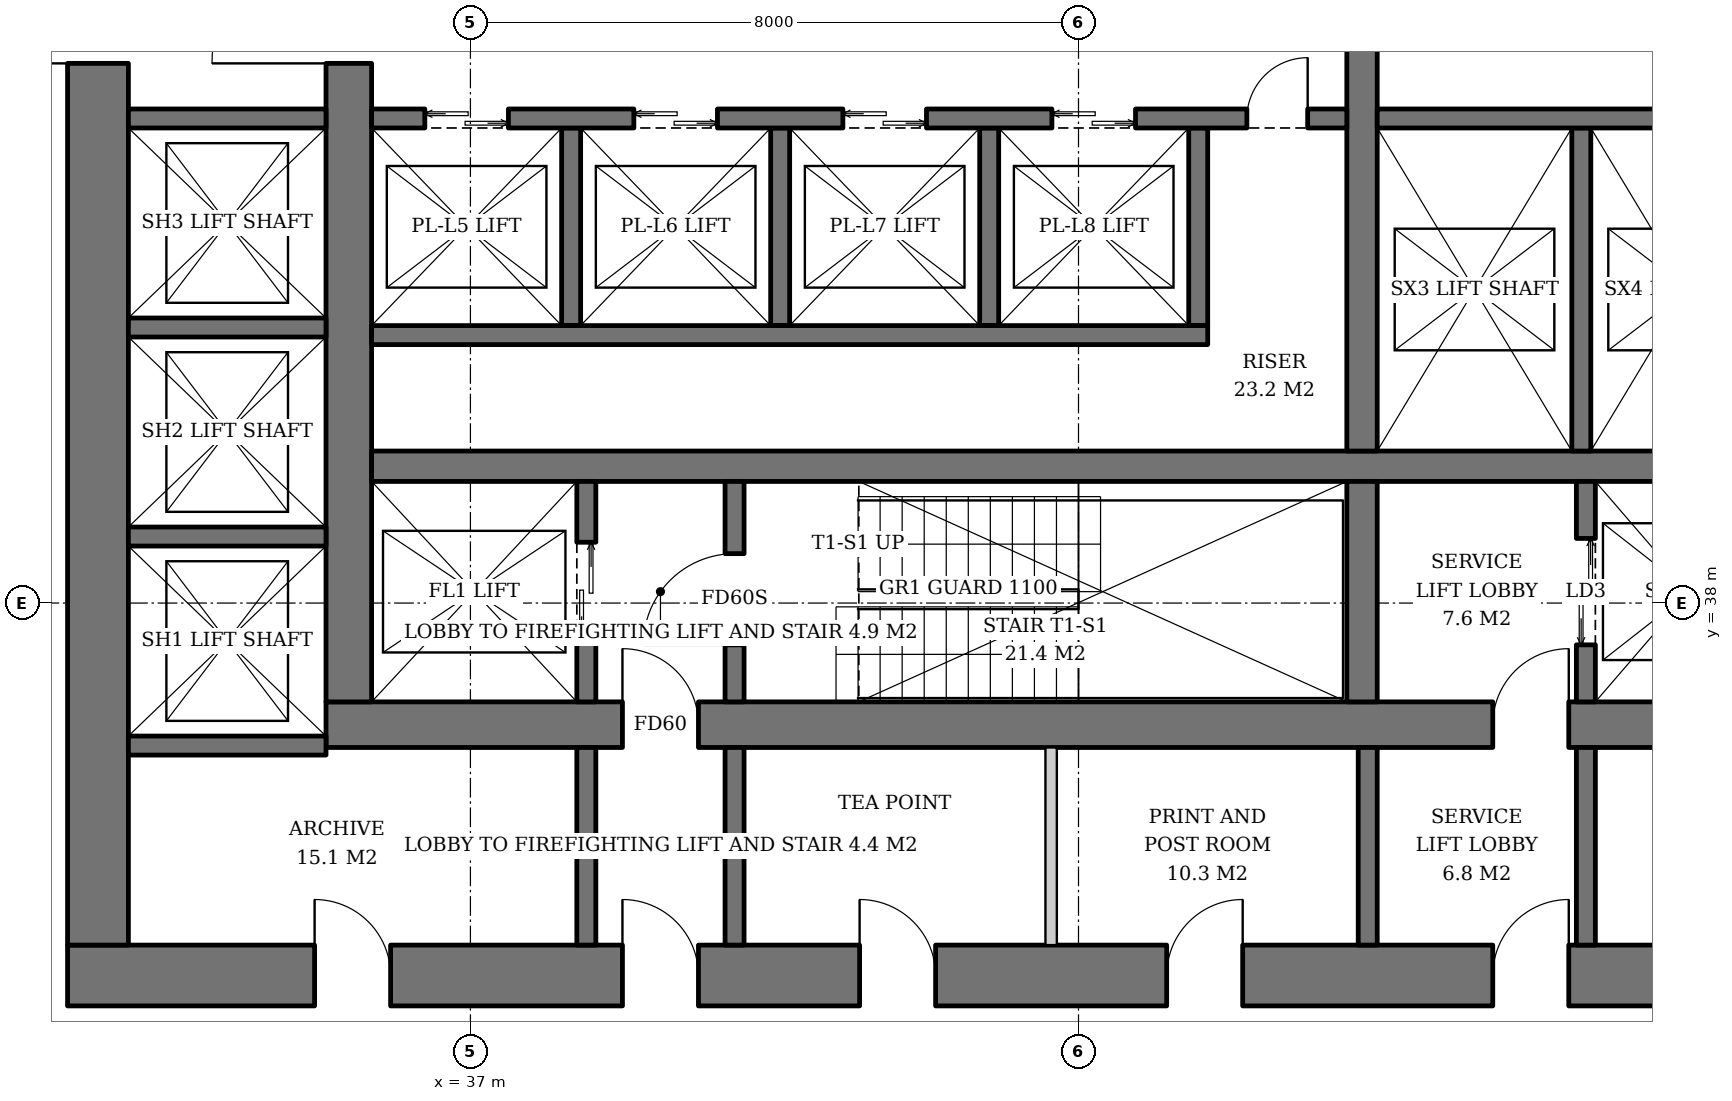
"""IFC4 building model, lengths in metres.
Left out: names, types, materials, properties, quantities, classifications, styles, units other than length and angle.
Written with IfcOpenShell. Run it as: python <this file> out.ifc"""

import sys

from ifc_helpers import new_model, si_unit, direction, frame, frame_2d, origin, place, context, subcontext, project, spatial, rectangle, extrude, element, fill, save


model = new_model("IFC4")
c1 = context("Model", 3, precision=1e-05, world=origin(), true_north=direction((0.0, 1.0)))
c2 = subcontext(c1, "Body", "Model", "MODEL_VIEW")
j1 = project(units=[si_unit("LENGTHUNIT", "METRE"), si_unit("PLANEANGLEUNIT", "RADIAN")], contexts=[c1])
p1 = place(None, origin())
s1 = spatial("IfcSite", under=j1, at=p1, CompositionType="ELEMENT")
p2 = place(p1, origin())
s2 = spatial("IfcBuilding", under=s1, at=p2, CompositionType="ELEMENT")
p3 = place(p2, frame((0.0, 0.0, 51.4)))
s3 = spatial("IfcBuildingStorey", under=s2, at=p3, CompositionType="ELEMENT", Elevation=51.4)
p4 = place(p3, frame((35.1, 36.4, 0.0), z_axis=(0.0, 0.0, 1.0), x_axis=(1.0, 0.0, 0.0)))
e1 = element("IfcWall", 1, at=p4, inside=s3, PredefinedType="SHEAR", context=c2, shape_type="SweptSolid", body=[
    extrude(rectangle(XDim=19.8, YDim=0.6, at=frame_2d((9.9, 0.0))), origin(), (0.0, 0.0, 1.0), 3.8),
])
p5 = place(p4, frame((3.9, 0.0, 0.0)))
e2 = element("IfcOpeningElement", 2, at=p5, cuts=e1, PredefinedType="OPENING", context=c2, shape_type="SweptSolid", body=[
    extrude(rectangle(XDim=1.0, YDim=2.1, at=frame_2d((0.5, 1.05))), frame((0.0, 0.31, 0.0), z_axis=(0.0, -1.0, 0.0), x_axis=(1.0, 0.0, 0.0)), (0.0, 0.0, 1.0), 0.62),
])
p6 = place(p4, frame((15.35, 0.0, 0.0)))
e3 = element("IfcOpeningElement", 3, at=p6, cuts=e1, PredefinedType="OPENING", context=c2, shape_type="SweptSolid", body=[
    extrude(rectangle(XDim=1.0, YDim=2.1, at=frame_2d((0.5, 1.05))), frame((0.0, 0.31, 0.0), z_axis=(0.0, -1.0, 0.0), x_axis=(1.0, 0.0, 0.0)), (0.0, 0.0, 1.0), 0.62),
])
p7 = place(p3, frame((35.4, 36.7, 0.0), z_axis=(0.0, 0.0, 1.0), x_axis=(0.0, 1.0, 0.0)))
e4 = element("IfcWall", 4, at=p7, inside=s3, PredefinedType="SHEAR", context=c2, shape_type="SweptSolid", body=[
    extrude(rectangle(XDim=18.6, YDim=0.6, at=frame_2d((9.3, 0.0))), origin(), (0.0, 0.0, 1.0), 3.8),
])
p8 = place(p7, frame((8.4, 0.0, 0.0)))
e5 = element("IfcOpeningElement", 5, at=p8, cuts=e4, PredefinedType="OPENING", context=c2, shape_type="SweptSolid", body=[
    extrude(rectangle(XDim=1.8, YDim=2.4, at=frame_2d((0.9, 1.2))), frame((0.0, 0.31, 0.0), z_axis=(0.0, -1.0, 0.0), x_axis=(1.0, 0.0, 0.0)), (0.0, 0.0, 1.0), 0.62),
])
p9 = place(p3, frame((31.7, 33.1, 0.0), z_axis=(0.0, 0.0, 1.0), x_axis=(1.0, 0.0, 0.0)))
e6 = element("IfcWall", 6, at=p9, inside=s3, PredefinedType="SHEAR", context=c2, shape_type="SweptSolid", body=[
    extrude(rectangle(XDim=26.6, YDim=0.8, at=frame_2d((13.3, 0.0))), origin(), (0.0, 0.0, 1.0), 3.8),
])
p10 = place(p9, frame((7.3, 0.0, 0.0)))
e7 = element("IfcOpeningElement", 7, at=p10, cuts=e6, PredefinedType="OPENING", context=c2, shape_type="SweptSolid", body=[
    extrude(rectangle(XDim=1.0, YDim=2.1, at=frame_2d((0.5, 1.05))), frame((0.0, 0.41, 0.0), z_axis=(0.0, -1.0, 0.0), x_axis=(1.0, 0.0, 0.0)), (0.0, 0.0, 1.0), 0.82),
])
p11 = place(p9, frame((18.75, 0.0, 0.0)))
e8 = element("IfcOpeningElement", 8, at=p11, cuts=e6, PredefinedType="OPENING", context=c2, shape_type="SweptSolid", body=[
    extrude(rectangle(XDim=1.0, YDim=2.1, at=frame_2d((0.5, 1.05))), frame((0.0, 0.41, 0.0), z_axis=(0.0, -1.0, 0.0), x_axis=(1.0, 0.0, 0.0)), (0.0, 0.0, 1.0), 0.82),
])
p12 = place(p9, frame((3.25, 0.0, 0.0)))
e9 = element("IfcOpeningElement", 9, at=p12, cuts=e6, PredefinedType="OPENING", context=c2, shape_type="SweptSolid", body=[
    extrude(rectangle(XDim=1.0, YDim=2.1, at=frame_2d((0.5, 1.05))), frame((0.0, 0.41, 0.0), z_axis=(0.0, -1.0, 0.0), x_axis=(1.0, 0.0, 0.0)), (0.0, 0.0, 1.0), 0.82),
])
p13 = place(p9, frame((10.42, 0.0, 0.0)))
e10 = element("IfcOpeningElement", 10, at=p13, cuts=e6, PredefinedType="OPENING", context=c2, shape_type="SweptSolid", body=[
    extrude(rectangle(XDim=1.0, YDim=2.1, at=frame_2d((0.5, 1.05))), frame((0.0, 0.41, 0.0), z_axis=(0.0, -1.0, 0.0), x_axis=(1.0, 0.0, 0.0)), (0.0, 0.0, 1.0), 0.82),
])
p14 = place(p9, frame((14.46, 0.0, 0.0)))
e11 = element("IfcOpeningElement", 11, at=p14, cuts=e6, PredefinedType="OPENING", context=c2, shape_type="SweptSolid", body=[
    extrude(rectangle(XDim=1.0, YDim=2.1, at=frame_2d((0.5, 1.05))), frame((0.0, 0.41, 0.0), z_axis=(0.0, -1.0, 0.0), x_axis=(1.0, 0.0, 0.0)), (0.0, 0.0, 1.0), 0.82),
])
p15 = place(p9, frame((22.45, 0.0, 0.0)))
e12 = element("IfcOpeningElement", 12, at=p15, cuts=e6, PredefinedType="OPENING", context=c2, shape_type="SweptSolid", body=[
    extrude(rectangle(XDim=1.0, YDim=2.1, at=frame_2d((0.5, 1.05))), frame((0.0, 0.41, 0.0), z_axis=(0.0, -1.0, 0.0), x_axis=(1.0, 0.0, 0.0)), (0.0, 0.0, 1.0), 0.82),
])
p16 = place(p3, frame((32.1, 33.5, 0.0), z_axis=(0.0, 0.0, 1.0), x_axis=(0.0, 1.0, 0.0)))
e13 = element("IfcWall", 13, at=p16, inside=s3, PredefinedType="SHEAR", context=c2, shape_type="SweptSolid", body=[
    extrude(rectangle(XDim=25.0, YDim=0.8, at=frame_2d((12.5, 0.0))), origin(), (0.0, 0.0, 1.0), 3.8),
])
p17 = place(p16, frame((11.6, 0.0, 0.0)))
e14 = element("IfcOpeningElement", 14, at=p17, cuts=e13, PredefinedType="OPENING", context=c2, shape_type="SweptSolid", body=[
    extrude(rectangle(XDim=1.8, YDim=2.4, at=frame_2d((0.9, 1.2))), frame((0.0, 0.41, 0.0), z_axis=(0.0, -1.0, 0.0), x_axis=(1.0, 0.0, 0.0)), (0.0, 0.0, 1.0), 0.82),
])
p18 = place(p3, frame((35.7, 39.8, 0.0), z_axis=(0.0, 0.0, 1.0), x_axis=(1.0, 0.0, 0.0)))
e15 = element("IfcWall", 15, at=p18, inside=s3, PredefinedType="SHEAR", context=c2, shape_type="SweptSolid", body=[
    extrude(rectangle(XDim=18.6, YDim=0.4, at=frame_2d((9.3, 0.0))), origin(), (0.0, 0.0, 1.0), 3.8),
])
p19 = place(p3, frame((48.73, 36.7, 0.0), z_axis=(0.0, 0.0, 1.0), x_axis=(0.0, 1.0, 0.0)))
e16 = element("IfcWall", 16, at=p19, inside=s3, PredefinedType="SHEAR", context=c2, shape_type="SweptSolid", body=[
    extrude(rectangle(XDim=2.9, YDim=0.4, at=frame_2d((1.45, 0.0))), origin(), (0.0, 0.0, 1.0), 3.8),
])
p20 = place(p3, frame((48.73, 40.0, 0.0), z_axis=(0.0, 0.0, 1.0), x_axis=(0.0, 1.0, 0.0)))
e17 = element("IfcWall", 17, at=p20, inside=s3, PredefinedType="SHEAR", context=c2, shape_type="SweptSolid", body=[
    extrude(rectangle(XDim=12.0, YDim=0.4, at=frame_2d((6.0, 0.0))), origin(), (0.0, 0.0, 1.0), 3.8),
])
p21 = place(p3, frame((38.525, 36.7, 0.0), z_axis=(0.0, 0.0, 1.0), x_axis=(0.0, 1.0, 0.0)))
e18 = element("IfcWall", 18, at=p21, inside=s3, PredefinedType="SHEAR", context=c2, shape_type="SweptSolid", body=[
    extrude(rectangle(XDim=2.9, YDim=0.25, at=frame_2d((1.45, 0.0))), origin(), (0.0, 0.0, 1.0), 3.8),
])
p22 = place(p21, frame((0.8, 0.0, 0.0)))
e19 = element("IfcOpeningElement", 19, at=p22, cuts=e18, PredefinedType="OPENING", context=c2, shape_type="SweptSolid", body=[
    extrude(rectangle(XDim=1.3, YDim=2.2, at=frame_2d((0.65, 1.1))), frame((0.0, 0.135, 0.0), z_axis=(0.0, -1.0, 0.0), x_axis=(1.0, 0.0, 0.0)), (0.0, 0.0, 1.0), 0.27),
])
p23 = place(p3, frame((40.475, 36.7, 0.0), z_axis=(0.0, 0.0, 1.0), x_axis=(0.0, 1.0, 0.0)))
e20 = element("IfcWall", 20, at=p23, inside=s3, PredefinedType="SHEAR", context=c2, shape_type="SweptSolid", body=[
    extrude(rectangle(XDim=2.9, YDim=0.25, at=frame_2d((1.45, 0.0))), origin(), (0.0, 0.0, 1.0), 3.8),
])
p24 = place(p23, frame((0.75, 0.0, 0.0)))
e21 = element("IfcOpeningElement", 21, at=p24, cuts=e20, PredefinedType="OPENING", context=c2, shape_type="SweptSolid", body=[
    extrude(rectangle(XDim=1.2, YDim=2.1, at=frame_2d((0.6, 1.05))), frame((0.0, 0.135, 0.0), z_axis=(0.0, -1.0, 0.0), x_axis=(1.0, 0.0, 0.0)), (0.0, 0.0, 1.0), 0.27),
])
p25 = place(p3, frame((51.675, 36.7, 0.0), z_axis=(0.0, 0.0, 1.0), x_axis=(0.0, 1.0, 0.0)))
e22 = element("IfcWall", 22, at=p25, inside=s3, PredefinedType="SHEAR", context=c2, shape_type="SweptSolid", body=[
    extrude(rectangle(XDim=2.9, YDim=0.25, at=frame_2d((1.45, 0.0))), origin(), (0.0, 0.0, 1.0), 3.8),
])
p26 = place(p25, frame((0.75, 0.0, 0.0)))
e23 = element("IfcOpeningElement", 23, at=p26, cuts=e22, PredefinedType="OPENING", context=c2, shape_type="SweptSolid", body=[
    extrude(rectangle(XDim=1.4, YDim=2.4, at=frame_2d((0.7, 1.2))), frame((0.0, 0.135, 0.0), z_axis=(0.0, -1.0, 0.0), x_axis=(1.0, 0.0, 0.0)), (0.0, 0.0, 1.0), 0.27),
])
for number, where, z_axis, x_axis in (
    (24, (38.325, 44.25, 0.0), (0.0, 0.0, 1.0), (0.0, -1.0, 0.0)),
    (25, (41.075, 44.25, 0.0), (0.0, 0.0, 1.0), (0.0, -1.0, 0.0)),
    (26, (43.825, 44.25, 0.0), (0.0, 0.0, 1.0), (0.0, -1.0, 0.0)),
    (27, (46.575, 44.25, 0.0), (0.0, 0.0, 1.0), (0.0, -1.0, 0.0)),
):
    element("IfcWall", number, at=place(p3, frame(where, z_axis=z_axis, x_axis=x_axis)), inside=s3, PredefinedType="SHEAR", context=c2, shape_type="SweptSolid", body=[
        extrude(rectangle(XDim=2.6, YDim=0.25, at=frame_2d((1.3, 0.0))), origin(), (0.0, 0.0, 1.0), 3.8),
    ])
p27 = place(p3, frame((35.7, 41.525, 0.0), z_axis=(0.0, 0.0, 1.0), x_axis=(1.0, 0.0, 0.0)))
e28 = element("IfcWall", 28, at=p27, inside=s3, PredefinedType="SHEAR", context=c2, shape_type="SweptSolid", body=[
    extrude(rectangle(XDim=11.0, YDim=0.25, at=frame_2d((5.5, 0.0))), origin(), (0.0, 0.0, 1.0), 3.8),
])
p28 = place(p3, frame((35.7, 44.375, 0.0), z_axis=(0.0, 0.0, 1.0), x_axis=(1.0, 0.0, 0.0)))
e29 = element("IfcWall", 29, at=p28, inside=s3, PredefinedType="SHEAR", context=c2, shape_type="SweptSolid", body=[
    extrude(rectangle(XDim=12.83, YDim=0.25, at=frame_2d((6.415, 0.0))), origin(), (0.0, 0.0, 1.0), 3.8),
])
p29 = place(p28, frame((0.7, 0.0, 0.0)))
e30 = element("IfcOpeningElement", 30, at=p29, cuts=e29, PredefinedType="OPENING", context=c2, shape_type="SweptSolid", body=[
    extrude(rectangle(XDim=1.1, YDim=2.2, at=frame_2d((0.55, 1.1))), frame((0.0, 0.135, 0.0), z_axis=(0.0, -1.0, 0.0), x_axis=(1.0, 0.0, 0.0)), (0.0, 0.0, 1.0), 0.27),
])
p30 = place(p28, frame((3.45, 0.0, 0.0)))
e31 = element("IfcOpeningElement", 31, at=p30, cuts=e29, PredefinedType="OPENING", context=c2, shape_type="SweptSolid", body=[
    extrude(rectangle(XDim=1.1, YDim=2.2, at=frame_2d((0.55, 1.1))), frame((0.0, 0.135, 0.0), z_axis=(0.0, -1.0, 0.0), x_axis=(1.0, 0.0, 0.0)), (0.0, 0.0, 1.0), 0.27),
])
p31 = place(p28, frame((6.2, 0.0, 0.0)))
e32 = element("IfcOpeningElement", 32, at=p31, cuts=e29, PredefinedType="OPENING", context=c2, shape_type="SweptSolid", body=[
    extrude(rectangle(XDim=1.1, YDim=2.2, at=frame_2d((0.55, 1.1))), frame((0.0, 0.135, 0.0), z_axis=(0.0, -1.0, 0.0), x_axis=(1.0, 0.0, 0.0)), (0.0, 0.0, 1.0), 0.27),
])
p32 = place(p28, frame((8.95, 0.0, 0.0)))
e33 = element("IfcOpeningElement", 33, at=p32, cuts=e29, PredefinedType="OPENING", context=c2, shape_type="SweptSolid", body=[
    extrude(rectangle(XDim=1.1, YDim=2.2, at=frame_2d((0.55, 1.1))), frame((0.0, 0.135, 0.0), z_axis=(0.0, -1.0, 0.0), x_axis=(1.0, 0.0, 0.0)), (0.0, 0.0, 1.0), 0.27),
])
p33 = place(p28, frame((11.515, 0.0, 0.0)))
e34 = element("IfcOpeningElement", 34, at=p33, cuts=e29, PredefinedType="OPENING", context=c2, shape_type="SweptSolid", body=[
    extrude(rectangle(XDim=0.8, YDim=2.0, at=frame_2d((0.4, 1.0))), frame((0.0, 0.135, 0.0), z_axis=(0.0, -1.0, 0.0), x_axis=(1.0, 0.0, 0.0)), (0.0, 0.0, 1.0), 0.27),
])
p34 = place(p3, frame((51.615, 44.25, 0.0), z_axis=(0.0, 0.0, 1.0), x_axis=(0.0, -1.0, 0.0)))
e35 = element("IfcWall", 35, at=p34, inside=s3, PredefinedType="SHEAR", context=c2, shape_type="SweptSolid", body=[
    extrude(rectangle(XDim=4.25, YDim=0.25, at=frame_2d((2.125, 0.0))), origin(), (0.0, 0.0, 1.0), 3.8),
])
p35 = place(p3, frame((48.93, 44.375, 0.0), z_axis=(0.0, 0.0, 1.0), x_axis=(1.0, 0.0, 0.0)))
e36 = element("IfcWall", 36, at=p35, inside=s3, PredefinedType="SHEAR", context=c2, shape_type="SweptSolid", body=[
    extrude(rectangle(XDim=5.37, YDim=0.25, at=frame_2d((2.685, 0.0))), origin(), (0.0, 0.0, 1.0), 3.8),
])
for number, where, z_axis, x_axis in (
    (37, (32.5, 36.125, 0.0), (0.0, 0.0, 1.0), (1.0, 0.0, 0.0)),
    (38, (32.5, 38.875, 0.0), (0.0, 0.0, 1.0), (1.0, 0.0, 0.0)),
    (39, (32.5, 41.625, 0.0), (0.0, 0.0, 1.0), (1.0, 0.0, 0.0)),
    (40, (32.5, 44.375, 0.0), (0.0, 0.0, 1.0), (1.0, 0.0, 0.0)),
):
    element("IfcWall", number, at=place(p3, frame(where, z_axis=z_axis, x_axis=x_axis)), inside=s3, PredefinedType="SHEAR", context=c2, shape_type="SweptSolid", body=[
        extrude(rectangle(XDim=2.6, YDim=0.25, at=frame_2d((1.3, 0.0))), origin(), (0.0, 0.0, 1.0), 3.8),
    ])
for number, where, z_axis, x_axis in (
    (41, (38.525, 33.5, 0.0), (0.0, 0.0, 1.0), (0.0, 1.0, 0.0)),
    (42, (40.475, 33.5, 0.0), (0.0, 0.0, 1.0), (0.0, 1.0, 0.0)),
    (43, (48.805, 33.5, 0.0), (0.0, 0.0, 1.0), (0.0, 1.0, 0.0)),
    (44, (51.675, 33.5, 0.0), (0.0, 0.0, 1.0), (0.0, 1.0, 0.0)),
):
    element("IfcWall", number, at=place(p3, frame(where, z_axis=z_axis, x_axis=x_axis)), inside=s3, PredefinedType="SOLIDWALL", context=c2, shape_type="SweptSolid", body=[
        extrude(rectangle(XDim=2.6, YDim=0.25, at=frame_2d((1.3, 0.0))), origin(), (0.0, 0.0, 1.0), 3.62),
    ])
p36 = place(p3, frame((44.64, 33.5, 0.0), z_axis=(0.0, 0.0, 1.0), x_axis=(0.0, 1.0, 0.0)))
e45 = element("IfcWall", 45, at=p36, inside=s3, PredefinedType="SOLIDWALL", context=c2, shape_type="SweptSolid", body=[
    extrude(rectangle(XDim=2.6, YDim=0.15, at=frame_2d((1.3, 0.0))), origin(), (0.0, 0.0, 1.0), 3.62),
])
p37 = place(p22, origin())
e46 = element("IfcDoor", 46, at=p37, inside=s3, OperationType="DOUBLE_DOOR_SLIDING", PredefinedType="DOOR", context=c2, shape_type="SweptSolid", body=[
    extrude(rectangle(XDim=1.3, YDim=2.2, at=frame_2d((0.65, 1.1))), frame((0.0, 0.025, 0.0), z_axis=(0.0, -1.0, 0.0), x_axis=(1.0, 0.0, 0.0)), (0.0, 0.0, 1.0), 0.05),
])
fill(e19, e46)
p38 = place(p24, origin())
e47 = element("IfcDoor", 47, at=p38, inside=s3, OperationType="SINGLE_SWING_LEFT", PredefinedType="DOOR", context=c2, shape_type="SweptSolid", body=[
    extrude(rectangle(XDim=1.2, YDim=2.1, at=frame_2d((0.6, 1.05))), frame((0.0, 0.025, 0.0), z_axis=(0.0, -1.0, 0.0), x_axis=(1.0, 0.0, 0.0)), (0.0, 0.0, 1.0), 0.05),
])
fill(e21, e47)
p39 = place(p26, origin())
e48 = element("IfcDoor", 48, at=p39, inside=s3, OperationType="DOUBLE_DOOR_SLIDING", PredefinedType="DOOR", context=c2, shape_type="SweptSolid", body=[
    extrude(rectangle(XDim=1.4, YDim=2.4, at=frame_2d((0.7, 1.2))), frame((0.0, 0.025, 0.0), z_axis=(0.0, -1.0, 0.0), x_axis=(1.0, 0.0, 0.0)), (0.0, 0.0, 1.0), 0.05),
])
fill(e23, e48)
p40 = place(p29, origin())
e49 = element("IfcDoor", 49, at=p40, inside=s3, OperationType="DOUBLE_DOOR_SLIDING", PredefinedType="DOOR", context=c2, shape_type="SweptSolid", body=[
    extrude(rectangle(XDim=1.1, YDim=2.2, at=frame_2d((0.55, 1.1))), frame((0.0, 0.025, 0.0), z_axis=(0.0, -1.0, 0.0), x_axis=(1.0, 0.0, 0.0)), (0.0, 0.0, 1.0), 0.05),
])
fill(e30, e49)
p41 = place(p30, origin())
e50 = element("IfcDoor", 50, at=p41, inside=s3, OperationType="DOUBLE_DOOR_SLIDING", PredefinedType="DOOR", context=c2, shape_type="SweptSolid", body=[
    extrude(rectangle(XDim=1.1, YDim=2.2, at=frame_2d((0.55, 1.1))), frame((0.0, 0.025, 0.0), z_axis=(0.0, -1.0, 0.0), x_axis=(1.0, 0.0, 0.0)), (0.0, 0.0, 1.0), 0.05),
])
fill(e31, e50)
p42 = place(p31, origin())
e51 = element("IfcDoor", 51, at=p42, inside=s3, OperationType="DOUBLE_DOOR_SLIDING", PredefinedType="DOOR", context=c2, shape_type="SweptSolid", body=[
    extrude(rectangle(XDim=1.1, YDim=2.2, at=frame_2d((0.55, 1.1))), frame((0.0, 0.025, 0.0), z_axis=(0.0, -1.0, 0.0), x_axis=(1.0, 0.0, 0.0)), (0.0, 0.0, 1.0), 0.05),
])
fill(e32, e51)
p43 = place(p32, origin())
e52 = element("IfcDoor", 52, at=p43, inside=s3, OperationType="DOUBLE_DOOR_SLIDING", PredefinedType="DOOR", context=c2, shape_type="SweptSolid", body=[
    extrude(rectangle(XDim=1.1, YDim=2.2, at=frame_2d((0.55, 1.1))), frame((0.0, 0.025, 0.0), z_axis=(0.0, -1.0, 0.0), x_axis=(1.0, 0.0, 0.0)), (0.0, 0.0, 1.0), 0.05),
])
fill(e33, e52)
p44 = place(p33, origin())
e53 = element("IfcDoor", 53, at=p44, inside=s3, OperationType="SINGLE_SWING_RIGHT", PredefinedType="DOOR", context=c2, shape_type="SweptSolid", body=[
    extrude(rectangle(XDim=0.8, YDim=2.0, at=frame_2d((0.4, 1.0))), frame((0.0, 0.025, 0.0), z_axis=(0.0, -1.0, 0.0), x_axis=(1.0, 0.0, 0.0)), (0.0, 0.0, 1.0), 0.05),
])
fill(e34, e53)
p45 = place(p5, origin())
e54 = element("IfcDoor", 54, at=p45, inside=s3, OperationType="SINGLE_SWING_LEFT", PredefinedType="DOOR", context=c2, shape_type="SweptSolid", body=[
    extrude(rectangle(XDim=1.0, YDim=2.1, at=frame_2d((0.5, 1.05))), frame((0.0, 0.025, 0.0), z_axis=(0.0, -1.0, 0.0), x_axis=(1.0, 0.0, 0.0)), (0.0, 0.0, 1.0), 0.05),
])
fill(e2, e54)
p46 = place(p8, origin())
e55 = element("IfcDoor", 55, at=p46, inside=s3, OperationType="DOUBLE_DOOR_SINGLE_SWING", PredefinedType="DOOR", context=c2, shape_type="SweptSolid", body=[
    extrude(rectangle(XDim=1.8, YDim=2.4, at=frame_2d((0.9, 1.2))), frame((0.0, 0.025, 0.0), z_axis=(0.0, -1.0, 0.0), x_axis=(1.0, 0.0, 0.0)), (0.0, 0.0, 1.0), 0.05),
])
fill(e5, e55)
p47 = place(p6, origin())
e56 = element("IfcDoor", 56, at=p47, inside=s3, OperationType="SINGLE_SWING_RIGHT", PredefinedType="DOOR", context=c2, shape_type="SweptSolid", body=[
    extrude(rectangle(XDim=1.0, YDim=2.1, at=frame_2d((0.5, 1.05))), frame((0.0, 0.025, 0.0), z_axis=(0.0, -1.0, 0.0), x_axis=(1.0, 0.0, 0.0)), (0.0, 0.0, 1.0), 0.05),
])
fill(e3, e56)
p48 = place(p17, origin())
e57 = element("IfcDoor", 57, at=p48, inside=s3, OperationType="DOUBLE_DOOR_SINGLE_SWING", PredefinedType="DOOR", context=c2, shape_type="SweptSolid", body=[
    extrude(rectangle(XDim=1.8, YDim=2.4, at=frame_2d((0.9, 1.2))), frame((0.0, 0.025, 0.0), z_axis=(0.0, -1.0, 0.0), x_axis=(1.0, 0.0, 0.0)), (0.0, 0.0, 1.0), 0.05),
])
fill(e14, e57)
p49 = place(p10, origin())
e58 = element("IfcDoor", 58, at=p49, inside=s3, OperationType="SINGLE_SWING_LEFT", PredefinedType="DOOR", context=c2, shape_type="SweptSolid", body=[
    extrude(rectangle(XDim=1.0, YDim=2.1, at=frame_2d((0.5, 1.05))), frame((0.0, 0.025, 0.0), z_axis=(0.0, -1.0, 0.0), x_axis=(1.0, 0.0, 0.0)), (0.0, 0.0, 1.0), 0.05),
])
fill(e7, e58)
p50 = place(p11, origin())
e59 = element("IfcDoor", 59, at=p50, inside=s3, OperationType="SINGLE_SWING_RIGHT", PredefinedType="DOOR", context=c2, shape_type="SweptSolid", body=[
    extrude(rectangle(XDim=1.0, YDim=2.1, at=frame_2d((0.5, 1.05))), frame((0.0, 0.025, 0.0), z_axis=(0.0, -1.0, 0.0), x_axis=(1.0, 0.0, 0.0)), (0.0, 0.0, 1.0), 0.05),
])
fill(e8, e59)
p51 = place(p12, origin())
e60 = element("IfcDoor", 60, at=p51, inside=s3, OperationType="SINGLE_SWING_LEFT", PredefinedType="DOOR", context=c2, shape_type="SweptSolid", body=[
    extrude(rectangle(XDim=1.0, YDim=2.1, at=frame_2d((0.5, 1.05))), frame((0.0, 0.39, 0.0), z_axis=(0.0, -1.0, 0.0), x_axis=(1.0, 0.0, 0.0)), (0.0, 0.0, 1.0), 0.05),
])
fill(e9, e60)
p52 = place(p13, origin())
e61 = element("IfcDoor", 61, at=p52, inside=s3, OperationType="SINGLE_SWING_LEFT", PredefinedType="DOOR", context=c2, shape_type="SweptSolid", body=[
    extrude(rectangle(XDim=1.0, YDim=2.1, at=frame_2d((0.5, 1.05))), frame((0.0, 0.39, 0.0), z_axis=(0.0, -1.0, 0.0), x_axis=(1.0, 0.0, 0.0)), (0.0, 0.0, 1.0), 0.05),
])
fill(e10, e61)
p53 = place(p14, origin())
e62 = element("IfcDoor", 62, at=p53, inside=s3, OperationType="SINGLE_SWING_RIGHT", PredefinedType="DOOR", context=c2, shape_type="SweptSolid", body=[
    extrude(rectangle(XDim=1.0, YDim=2.1, at=frame_2d((0.5, 1.05))), frame((0.0, 0.39, 0.0), z_axis=(0.0, -1.0, 0.0), x_axis=(1.0, 0.0, 0.0)), (0.0, 0.0, 1.0), 0.05),
])
fill(e11, e62)
save(model, sys.argv[1])
